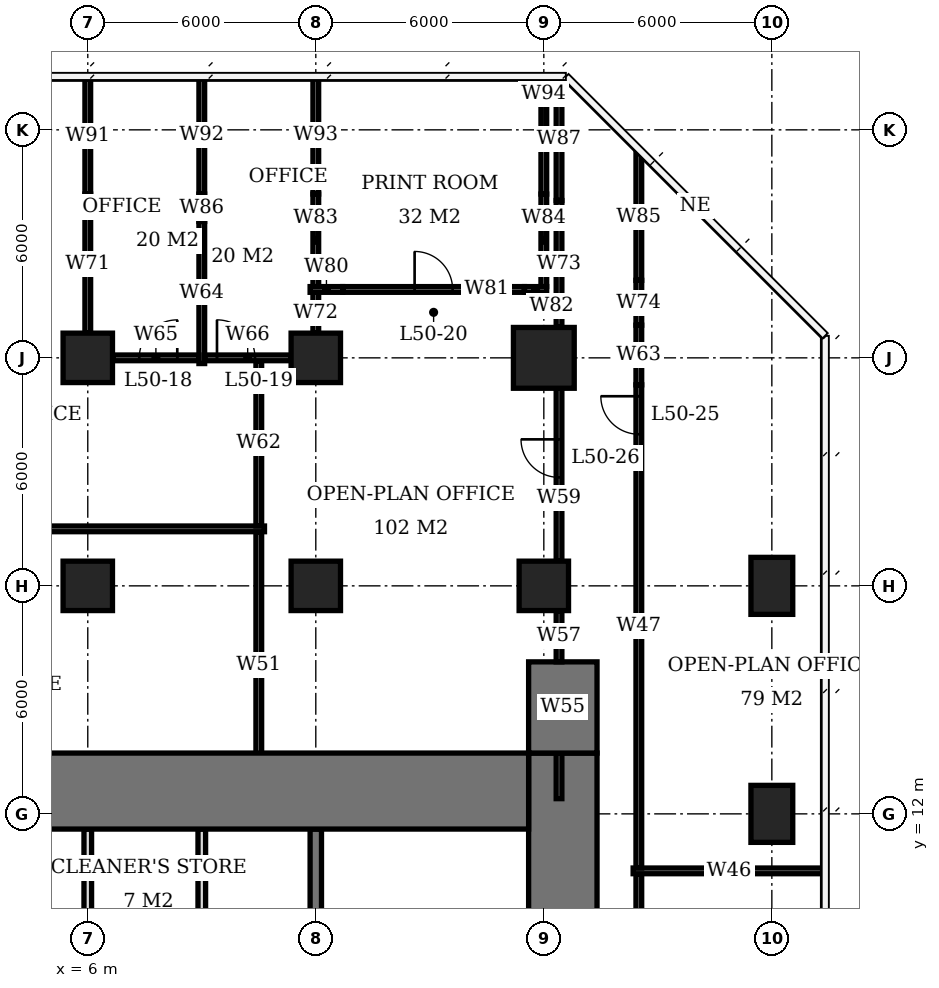
"""IFC4 building model, lengths in metres.
Left out: names, types, materials, properties, quantities, classifications, styles, units other than length and angle.
Written with IfcOpenShell. Run it as: python <this file> out.ifc"""

import sys

from ifc_helpers import new_model, si_unit, direction, frame, frame_2d, origin, origin_2d, place, context, subcontext, project, spatial, rectangle, extrude, element, fill, save


model = new_model("IFC4")
c1 = context("Model", 3, precision=1e-05, world=origin(), true_north=direction((0.0, 1.0)))
c2 = subcontext(c1, "Body", "Model", "MODEL_VIEW")
j1 = project(units=[si_unit("LENGTHUNIT", "METRE"), si_unit("PLANEANGLEUNIT", "RADIAN")], contexts=[c1])
p1 = place(None, origin())
s1 = spatial("IfcSite", under=j1, at=p1, CompositionType="ELEMENT")
p2 = place(p1, origin())
s2 = spatial("IfcBuilding", under=s1, at=p2, CompositionType="ELEMENT")
p3 = place(p2, frame((0.0, 0.0, 204.5)))
s3 = spatial("IfcBuildingStorey", under=s2, at=p3, CompositionType="ELEMENT", Elevation=204.5)
for number, where, z_axis, x_axis in (
    (1, (6.0, 18.0, 0.0), (0.0, 0.0, 1.0), (1.0, 0.0, 0.0)),
    (2, (6.0, 24.0, 0.0), (0.0, 0.0, 1.0), (1.0, 0.0, 0.0)),
    (3, (12.0, 18.0, 0.0), (0.0, 0.0, 1.0), (1.0, 0.0, 0.0)),
    (4, (12.0, 24.0, 0.0), (0.0, 0.0, 1.0), (1.0, 0.0, 0.0)),
    (5, (18.0, 18.0, 0.0), (0.0, 0.0, 1.0), (1.0, 0.0, 0.0)),
):
    element("IfcColumn", number, at=place(p3, frame(where, z_axis=z_axis, x_axis=x_axis)), inside=s3, PredefinedType="COLUMN", context=c2, shape_type="SweptSolid", body=[
        extrude(rectangle(XDim=1.3, YDim=1.3, at=origin_2d()), origin(), (0.0, 0.0, 1.0), 3.9),
    ])
p4 = place(p3, frame((18.0, 24.0, 0.0), z_axis=(0.0, 0.0, 1.0), x_axis=(1.0, 0.0, 0.0)))
e6 = element("IfcColumn", 6, at=p4, inside=s3, PredefinedType="COLUMN", context=c2, shape_type="SweptSolid", body=[
    extrude(rectangle(XDim=1.6, YDim=1.6, at=origin_2d()), origin(), (0.0, 0.0, 1.0), 3.9),
])
for number, where, z_axis, x_axis in (
    (7, (24.0, 12.0, 0.0), (0.0, 0.0, 1.0), (0.0, 1.0, 0.0)),
    (8, (24.0, 18.0, 0.0), (0.0, 0.0, 1.0), (0.0, 1.0, 0.0)),
):
    element("IfcColumn", number, at=place(p3, frame(where, z_axis=z_axis, x_axis=x_axis)), inside=s3, PredefinedType="COLUMN", context=c2, shape_type="SweptSolid", body=[
        extrude(rectangle(XDim=1.5, YDim=1.1, at=origin_2d()), origin(), (0.0, 0.0, 1.0), 3.9),
    ])
p5 = place(p3, frame((-5.6, 12.6, 0.0), z_axis=(0.0, 0.0, 1.0), x_axis=(1.0, 0.0, 0.0)))
e9 = element("IfcWall", 9, at=p5, inside=s3, PredefinedType="SHEAR", context=c2, shape_type="SweptSolid", body=[
    extrude(rectangle(XDim=23.2, YDim=2.0, at=frame_2d((11.6, 0.0))), origin(), (0.0, 0.0, 1.0), 3.9),
])
p6 = place(p3, frame((18.5, -7.6, 0.0), z_axis=(0.0, 0.0, 1.0), x_axis=(0.0, 1.0, 0.0)))
e10 = element("IfcWall", 10, at=p6, inside=s3, PredefinedType="SHEAR", context=c2, shape_type="SweptSolid", body=[
    extrude(rectangle(XDim=21.2, YDim=1.8, at=frame_2d((10.6, 0.0))), origin(), (0.0, 0.0, 1.0), 3.9),
])
p7 = place(p6, frame((9.2, 0.0, 0.0)))
e11 = element("IfcOpeningElement", 11, at=p7, cuts=e10, PredefinedType="OPENING", context=c2, shape_type="SweptSolid", body=[
    extrude(rectangle(XDim=1.8, YDim=2.4, at=frame_2d((0.9, 1.2))), frame((0.0, 0.91, 0.0), z_axis=(0.0, -1.0, 0.0), x_axis=(1.0, 0.0, 0.0)), (0.0, 0.0, 1.0), 1.82),
])
p8 = place(p3, frame((18.5, 13.6, 0.0), z_axis=(0.0, 0.0, 1.0), x_axis=(0.0, 1.0, 0.0)))
e12 = element("IfcWall", 12, at=p8, inside=s3, PredefinedType="SHEAR", context=c2, shape_type="SweptSolid", body=[
    extrude(rectangle(XDim=2.4, YDim=1.8, at=frame_2d((1.2, 0.0))), origin(), (0.0, 0.0, 1.0), 3.9),
])
p9 = place(p3, frame((12.0, 6.15, 0.0), z_axis=(0.0, 0.0, 1.0), x_axis=(0.0, 1.0, 0.0)))
e13 = element("IfcWall", 13, at=p9, inside=s3, PredefinedType="SHEAR", context=c2, shape_type="SweptSolid", body=[
    extrude(rectangle(XDim=5.45, YDim=0.3, at=frame_2d((2.725, 0.0))), origin(), (0.0, 0.0, 1.0), 3.9),
])
for number, where, z_axis, x_axis in (
    (14, (6.0, 6.15, 0.0), (0.0, 0.0, 1.0), (0.0, 1.0, 0.0)),
    (15, (9.0, 6.15, 0.0), (0.0, 0.0, 1.0), (0.0, 1.0, 0.0)),
):
    element("IfcWall", number, at=place(p3, frame(where, z_axis=z_axis, x_axis=x_axis)), inside=s3, PredefinedType="SOLIDWALL", context=c2, shape_type="SweptSolid", body=[
        extrude(rectangle(XDim=5.45, YDim=0.2, at=frame_2d((2.725, 0.0))), origin(), (0.0, 0.0, 1.0), 3.9),
    ])
p10 = place(p3, frame((6.66, 24.0, 0.0), z_axis=(0.0, 0.0, 1.0), x_axis=(1.0, 0.0, 0.0)))
e16 = element("IfcWall", 16, at=p10, inside=s3, PredefinedType="PARTITIONING", context=c2, shape_type="SweptSolid", body=[
    extrude(rectangle(XDim=2.265, YDim=0.15, at=frame_2d((1.133, 0.0))), origin(), (0.0, 0.0, 1.0), 3.65),
])
p11 = place(p10, frame((0.695, 0.0, 0.0)))
e17 = element("IfcOpeningElement", 17, at=p11, cuts=e16, PredefinedType="OPENING", context=c2, shape_type="SweptSolid", body=[
    extrude(rectangle(XDim=1.0, YDim=2.1, at=frame_2d((0.5, 1.05))), frame((0.0, 0.085, 0.0), z_axis=(0.0, -1.0, 0.0), x_axis=(1.0, 0.0, 0.0)), (0.0, 0.0, 1.0), 0.17),
])
p12 = place(p3, frame((9.075, 24.0, 0.0), z_axis=(0.0, 0.0, 1.0), x_axis=(1.0, 0.0, 0.0)))
e18 = element("IfcWall", 18, at=p12, inside=s3, PredefinedType="PARTITIONING", context=c2, shape_type="SweptSolid", body=[
    extrude(rectangle(XDim=2.265, YDim=0.15, at=frame_2d((1.133, 0.0))), origin(), (0.0, 0.0, 1.0), 3.65),
])
p13 = place(p12, frame((0.325, 0.0, 0.0)))
e19 = element("IfcOpeningElement", 19, at=p13, cuts=e18, PredefinedType="OPENING", context=c2, shape_type="SweptSolid", body=[
    extrude(rectangle(XDim=1.0, YDim=2.1, at=frame_2d((0.5, 1.05))), frame((0.0, 0.085, 0.0), z_axis=(0.0, -1.0, 0.0), x_axis=(1.0, 0.0, 0.0)), (0.0, 0.0, 1.0), 0.17),
])
p14 = place(p3, frame((11.85, 25.8, 0.0), z_axis=(0.0, 0.0, 1.0), x_axis=(1.0, 0.0, 0.0)))
e20 = element("IfcWall", 20, at=p14, inside=s3, PredefinedType="PARTITIONING", context=c2, shape_type="SweptSolid", body=[
    extrude(rectangle(XDim=0.86, YDim=0.15, at=frame_2d((0.43, 0.0))), origin(), (0.0, 0.0, 1.0), 2.65),
])
p15 = place(p3, frame((12.71, 25.8, 0.0), z_axis=(0.0, 0.0, 1.0), x_axis=(1.0, 0.0, 0.0)))
e21 = element("IfcWall", 21, at=p15, inside=s3, PredefinedType="PARTITIONING", context=c2, shape_type="SweptSolid", body=[
    extrude(rectangle(XDim=4.78, YDim=0.15, at=frame_2d((2.39, 0.0))), origin(), (0.0, 0.0, 1.0), 3.65),
])
p16 = place(p15, frame((1.89, 0.0, 0.0)))
e22 = element("IfcOpeningElement", 22, at=p16, cuts=e21, PredefinedType="OPENING", context=c2, shape_type="SweptSolid", body=[
    extrude(rectangle(XDim=1.0, YDim=2.1, at=frame_2d((0.5, 1.05))), frame((0.0, 0.085, 0.0), z_axis=(0.0, -1.0, 0.0), x_axis=(1.0, 0.0, 0.0)), (0.0, 0.0, 1.0), 0.17),
])
p17 = place(p3, frame((17.49, 25.8, 0.0), z_axis=(0.0, 0.0, 1.0), x_axis=(1.0, 0.0, 0.0)))
e23 = element("IfcWall", 23, at=p17, inside=s3, PredefinedType="PARTITIONING", context=c2, shape_type="SweptSolid", body=[
    extrude(rectangle(XDim=0.585, YDim=0.15, at=frame_2d((0.292, 0.0))), origin(), (0.0, 0.0, 1.0), 2.65),
])
p18 = place(p3, frame((6.0, 24.65, 0.0), z_axis=(0.0, 0.0, 1.0), x_axis=(0.0, 1.0, 0.0)))
e24 = element("IfcWall", 24, at=p18, inside=s3, PredefinedType="PARTITIONING", context=c2, shape_type="SweptSolid", body=[
    extrude(rectangle(XDim=3.66, YDim=0.15, at=frame_2d((1.83, 0.0))), origin(), (0.0, 0.0, 1.0), 2.65),
])
p19 = place(p3, frame((6.0, 28.31, 0.0), z_axis=(0.0, 0.0, 1.0), x_axis=(0.0, 1.0, 0.0)))
e25 = element("IfcWall", 25, at=p19, inside=s3, PredefinedType="PARTITIONING", context=c2, shape_type="SweptSolid", body=[
    extrude(rectangle(XDim=3.04, YDim=0.15, at=frame_2d((1.52, 0.0))), origin(), (0.0, 0.0, 1.0), 3.65),
])
p20 = place(p3, frame((9.0, 23.85, 0.0), z_axis=(0.0, 0.0, 1.0), x_axis=(0.0, 1.0, 0.0)))
e26 = element("IfcWall", 26, at=p20, inside=s3, PredefinedType="PARTITIONING", context=c2, shape_type="SweptSolid", body=[
    extrude(rectangle(XDim=3.74, YDim=0.15, at=frame_2d((1.87, 0.0))), origin(), (0.0, 0.0, 1.0), 3.65),
])
p21 = place(p3, frame((9.0, 27.59, 0.0), z_axis=(0.0, 0.0, 1.0), x_axis=(0.0, 1.0, 0.0)))
e27 = element("IfcWall", 27, at=p21, inside=s3, PredefinedType="PARTITIONING", context=c2, shape_type="SweptSolid", body=[
    extrude(rectangle(XDim=0.72, YDim=0.15, at=frame_2d((0.36, 0.0))), origin(), (0.0, 0.0, 1.0), 2.65),
])
p22 = place(p3, frame((9.0, 28.31, 0.0), z_axis=(0.0, 0.0, 1.0), x_axis=(0.0, 1.0, 0.0)))
e28 = element("IfcWall", 28, at=p22, inside=s3, PredefinedType="PARTITIONING", context=c2, shape_type="SweptSolid", body=[
    extrude(rectangle(XDim=3.09, YDim=0.15, at=frame_2d((1.545, 0.0))), origin(), (0.0, 0.0, 1.0), 3.65),
])
p23 = place(p3, frame((12.0, 24.65, 0.0), z_axis=(0.0, 0.0, 1.0), x_axis=(0.0, 1.0, 0.0)))
e29 = element("IfcWall", 29, at=p23, inside=s3, PredefinedType="PARTITIONING", context=c2, shape_type="SweptSolid", body=[
    extrude(rectangle(XDim=1.075, YDim=0.15, at=frame_2d((0.538, 0.0))), origin(), (0.0, 0.0, 1.0), 2.65),
])
p24 = place(p3, frame((12.0, 25.875, 0.0), z_axis=(0.0, 0.0, 1.0), x_axis=(0.0, 1.0, 0.0)))
e30 = element("IfcWall", 30, at=p24, inside=s3, PredefinedType="PARTITIONING", context=c2, shape_type="SweptSolid", body=[
    extrude(rectangle(XDim=2.435, YDim=0.15, at=frame_2d((1.218, 0.0))), origin(), (0.0, 0.0, 1.0), 2.65),
])
p25 = place(p3, frame((12.0, 28.31, 0.0), z_axis=(0.0, 0.0, 1.0), x_axis=(0.0, 1.0, 0.0)))
e31 = element("IfcWall", 31, at=p25, inside=s3, PredefinedType="PARTITIONING", context=c2, shape_type="SweptSolid", body=[
    extrude(rectangle(XDim=3.09, YDim=0.15, at=frame_2d((1.545, 0.0))), origin(), (0.0, 0.0, 1.0), 3.65),
])
p26 = place(p3, frame((18.0, 25.875, 0.0), z_axis=(0.0, 0.0, 1.0), x_axis=(0.0, 1.0, 0.0)))
e32 = element("IfcWall", 32, at=p26, inside=s3, PredefinedType="PARTITIONING", context=c2, shape_type="SweptSolid", body=[
    extrude(rectangle(XDim=2.435, YDim=0.15, at=frame_2d((1.218, 0.0))), origin(), (0.0, 0.0, 1.0), 2.65),
])
p27 = place(p3, frame((18.0, 28.31, 0.0), z_axis=(0.0, 0.0, 1.0), x_axis=(0.0, 1.0, 0.0)))
e33 = element("IfcWall", 33, at=p27, inside=s3, PredefinedType="PARTITIONING", context=c2, shape_type="SweptSolid", body=[
    extrude(rectangle(XDim=3.09, YDim=0.15, at=frame_2d((1.545, 0.0))), origin(), (0.0, 0.0, 1.0), 3.65),
])
p28 = place(p3, frame((-6.325, 19.5, 0.0), z_axis=(0.0, 0.0, 1.0), x_axis=(1.0, 0.0, 0.0)))
e34 = element("IfcWall", 34, at=p28, inside=s3, PredefinedType="PARTITIONING", context=c2, shape_type="SweptSolid", body=[
    extrude(rectangle(XDim=16.975, YDim=0.15, at=frame_2d((8.487, 0.0))), origin(), (0.0, 0.0, 1.0), 3.65),
])
p29 = place(p3, frame((10.5, 12.4, 0.0), z_axis=(0.0, 0.0, 1.0), x_axis=(0.0, 1.0, 0.0)))
e35 = element("IfcWall", 35, at=p29, inside=s3, PredefinedType="PARTITIONING", context=c2, shape_type="SweptSolid", body=[
    extrude(rectangle(XDim=7.025, YDim=0.15, at=frame_2d((3.513, 0.0))), origin(), (0.0, 0.0, 1.0), 3.65),
])
p30 = place(p3, frame((10.5, 19.575, 0.0), z_axis=(0.0, 0.0, 1.0), x_axis=(0.0, 1.0, 0.0)))
e36 = element("IfcWall", 36, at=p30, inside=s3, PredefinedType="PARTITIONING", context=c2, shape_type="SweptSolid", body=[
    extrude(rectangle(XDim=4.35, YDim=0.15, at=frame_2d((2.175, 0.0))), origin(), (0.0, 0.0, 1.0), 3.65),
])
p31 = place(p3, frame((18.4, 12.4, 0.0), z_axis=(0.0, 0.0, 1.0), x_axis=(0.0, 1.0, 0.0)))
e37 = element("IfcWall", 37, at=p31, inside=s3, PredefinedType="PARTITIONING", context=c2, shape_type="SweptSolid", body=[
    extrude(rectangle(XDim=1.2, YDim=0.15, at=frame_2d((0.6, 0.0))), origin(), (0.0, 0.0, 1.0), 3.65),
])
p32 = place(p3, frame((18.4, 16.0, 0.0), z_axis=(0.0, 0.0, 1.0), x_axis=(0.0, 1.0, 0.0)))
e38 = element("IfcWall", 38, at=p32, inside=s3, PredefinedType="PARTITIONING", context=c2, shape_type="SweptSolid", body=[
    extrude(rectangle(XDim=1.35, YDim=0.15, at=frame_2d((0.675, 0.0))), origin(), (0.0, 0.0, 1.0), 3.65),
])
p33 = place(p3, frame((18.4, 18.65, 0.0), z_axis=(0.0, 0.0, 1.0), x_axis=(0.0, 1.0, 0.0)))
e39 = element("IfcWall", 39, at=p33, inside=s3, PredefinedType="PARTITIONING", context=c2, shape_type="SweptSolid", body=[
    extrude(rectangle(XDim=4.55, YDim=0.15, at=frame_2d((2.275, 0.0))), origin(), (0.0, 0.0, 1.0), 3.65),
])
p34 = place(p33, frame((2.205, 0.0, 0.0)))
e40 = element("IfcOpeningElement", 40, at=p34, cuts=e39, PredefinedType="OPENING", context=c2, shape_type="SweptSolid", body=[
    extrude(rectangle(XDim=1.0, YDim=2.1, at=frame_2d((0.5, 1.05))), frame((0.0, 0.085, 0.0), z_axis=(0.0, -1.0, 0.0), x_axis=(1.0, 0.0, 0.0)), (0.0, 0.0, 1.0), 0.17),
])
p35 = place(p3, frame((18.4, 24.8, 0.0), z_axis=(0.0, 0.0, 1.0), x_axis=(0.0, 1.0, 0.0)))
e41 = element("IfcWall", 41, at=p35, inside=s3, PredefinedType="PARTITIONING", context=c2, shape_type="SweptSolid", body=[
    extrude(rectangle(XDim=3.34, YDim=0.15, at=frame_2d((1.67, 0.0))), origin(), (0.0, 0.0, 1.0), 2.65),
])
p36 = place(p3, frame((18.4, 28.14, 0.0), z_axis=(0.0, 0.0, 1.0), x_axis=(0.0, 1.0, 0.0)))
e42 = element("IfcWall", 42, at=p36, inside=s3, PredefinedType="PARTITIONING", context=c2, shape_type="SweptSolid", body=[
    extrude(rectangle(XDim=3.26, YDim=0.15, at=frame_2d((1.63, 0.0))), origin(), (0.0, 0.0, 1.0), 3.65),
])
p37 = place(p3, frame((20.5, 1.575, 0.0), z_axis=(0.0, 0.0, 1.0), x_axis=(0.0, 1.0, 0.0)))
e43 = element("IfcWall", 43, at=p37, inside=s3, PredefinedType="PARTITIONING", context=c2, shape_type="SweptSolid", body=[
    extrude(rectangle(XDim=8.85, YDim=0.15, at=frame_2d((4.425, 0.0))), origin(), (0.0, 0.0, 1.0), 3.65),
])
p38 = place(p37, frame((5.275, 0.0, 0.0)))
e44 = element("IfcOpeningElement", 44, at=p38, cuts=e43, PredefinedType="OPENING", context=c2, shape_type="SweptSolid", body=[
    extrude(rectangle(XDim=1.0, YDim=2.1, at=frame_2d((0.5, 1.05))), frame((0.0, 0.085, 0.0), z_axis=(0.0, -1.0, 0.0), x_axis=(1.0, 0.0, 0.0)), (0.0, 0.0, 1.0), 0.17),
])
p39 = place(p3, frame((20.5, 10.575, 0.0), z_axis=(0.0, 0.0, 1.0), x_axis=(0.0, 1.0, 0.0)))
e45 = element("IfcWall", 45, at=p39, inside=s3, PredefinedType="PARTITIONING", context=c2, shape_type="SweptSolid", body=[
    extrude(rectangle(XDim=12.715, YDim=0.15, at=frame_2d((6.357, 0.0))), origin(), (0.0, 0.0, 1.0), 3.65),
])
p40 = place(p39, frame((11.415, 0.0, 0.0)))
e46 = element("IfcOpeningElement", 46, at=p40, cuts=e45, PredefinedType="OPENING", context=c2, shape_type="SweptSolid", body=[
    extrude(rectangle(XDim=1.0, YDim=2.1, at=frame_2d((0.5, 1.05))), frame((0.0, 0.085, 0.0), z_axis=(0.0, -1.0, 0.0), x_axis=(1.0, 0.0, 0.0)), (0.0, 0.0, 1.0), 0.17),
])
p41 = place(p3, frame((20.5, 23.29, 0.0), z_axis=(0.0, 0.0, 1.0), x_axis=(0.0, 1.0, 0.0)))
e47 = element("IfcWall", 47, at=p41, inside=s3, PredefinedType="PARTITIONING", context=c2, shape_type="SweptSolid", body=[
    extrude(rectangle(XDim=1.57, YDim=0.15, at=frame_2d((0.785, 0.0))), origin(), (0.0, 0.0, 1.0), 2.65),
])
p42 = place(p3, frame((20.5, 24.86, 0.0), z_axis=(0.0, 0.0, 1.0), x_axis=(0.0, 1.0, 0.0)))
e48 = element("IfcWall", 48, at=p42, inside=s3, PredefinedType="PARTITIONING", context=c2, shape_type="SweptSolid", body=[
    extrude(rectangle(XDim=1.18, YDim=0.15, at=frame_2d((0.59, 0.0))), origin(), (0.0, 0.0, 1.0), 2.65),
])
p43 = place(p3, frame((20.5, 26.04, 0.0), z_axis=(0.0, 0.0, 1.0), x_axis=(0.0, 1.0, 0.0)))
e49 = element("IfcWall", 49, at=p43, inside=s3, PredefinedType="PARTITIONING", context=c2, shape_type="SweptSolid", body=[
    extrude(rectangle(XDim=3.348, YDim=0.15, at=frame_2d((1.674, 0.0))), origin(), (0.0, 0.0, 1.0), 3.65),
])
p44 = place(p3, frame((20.35, 10.5, 0.0), z_axis=(0.0, 0.0, 1.0), x_axis=(1.0, 0.0, 0.0)))
e50 = element("IfcWall", 50, at=p44, inside=s3, PredefinedType="PARTITIONING", context=c2, shape_type="SweptSolid", body=[
    extrude(rectangle(XDim=5.05, YDim=0.15, at=frame_2d((2.525, 0.0))), origin(), (0.0, 0.0, 1.0), 3.65),
])
p45 = place(p11, origin())
e51 = element("IfcDoor", 51, at=p45, inside=s3, OperationType="SINGLE_SWING_RIGHT", PredefinedType="DOOR", context=c2, shape_type="SweptSolid", body=[
    extrude(rectangle(XDim=1.0, YDim=2.1, at=frame_2d((0.5, 1.05))), frame((0.0, 0.025, 0.0), z_axis=(0.0, -1.0, 0.0), x_axis=(1.0, 0.0, 0.0)), (0.0, 0.0, 1.0), 0.05),
])
fill(e17, e51)
p46 = place(p13, origin())
e52 = element("IfcDoor", 52, at=p46, inside=s3, OperationType="SINGLE_SWING_LEFT", PredefinedType="DOOR", context=c2, shape_type="SweptSolid", body=[
    extrude(rectangle(XDim=1.0, YDim=2.1, at=frame_2d((0.5, 1.05))), frame((0.0, 0.025, 0.0), z_axis=(0.0, -1.0, 0.0), x_axis=(1.0, 0.0, 0.0)), (0.0, 0.0, 1.0), 0.05),
])
fill(e19, e52)
p47 = place(p16, origin())
e53 = element("IfcDoor", 53, at=p47, inside=s3, OperationType="SINGLE_SWING_LEFT", PredefinedType="DOOR", context=c2, shape_type="SweptSolid", body=[
    extrude(rectangle(XDim=1.0, YDim=2.1, at=frame_2d((0.5, 1.05))), frame((0.0, 0.025, 0.0), z_axis=(0.0, -1.0, 0.0), x_axis=(1.0, 0.0, 0.0)), (0.0, 0.0, 1.0), 0.05),
])
fill(e22, e53)
p48 = place(p40, origin())
e54 = element("IfcDoor", 54, at=p48, inside=s3, OperationType="SINGLE_SWING_RIGHT", PredefinedType="DOOR", context=c2, shape_type="SweptSolid", body=[
    extrude(rectangle(XDim=1.0, YDim=2.1, at=frame_2d((0.5, 1.05))), frame((0.0, 0.025, 0.0), z_axis=(0.0, -1.0, 0.0), x_axis=(1.0, 0.0, 0.0)), (0.0, 0.0, 1.0), 0.05),
])
fill(e46, e54)
p49 = place(p34, origin())
e55 = element("IfcDoor", 55, at=p49, inside=s3, OperationType="SINGLE_SWING_RIGHT", PredefinedType="DOOR", context=c2, shape_type="SweptSolid", body=[
    extrude(rectangle(XDim=1.0, YDim=2.1, at=frame_2d((0.5, 1.05))), frame((0.0, 0.025, 0.0), z_axis=(0.0, -1.0, 0.0), x_axis=(1.0, 0.0, 0.0)), (0.0, 0.0, 1.0), 0.05),
])
fill(e40, e55)
save(model, sys.argv[1])
